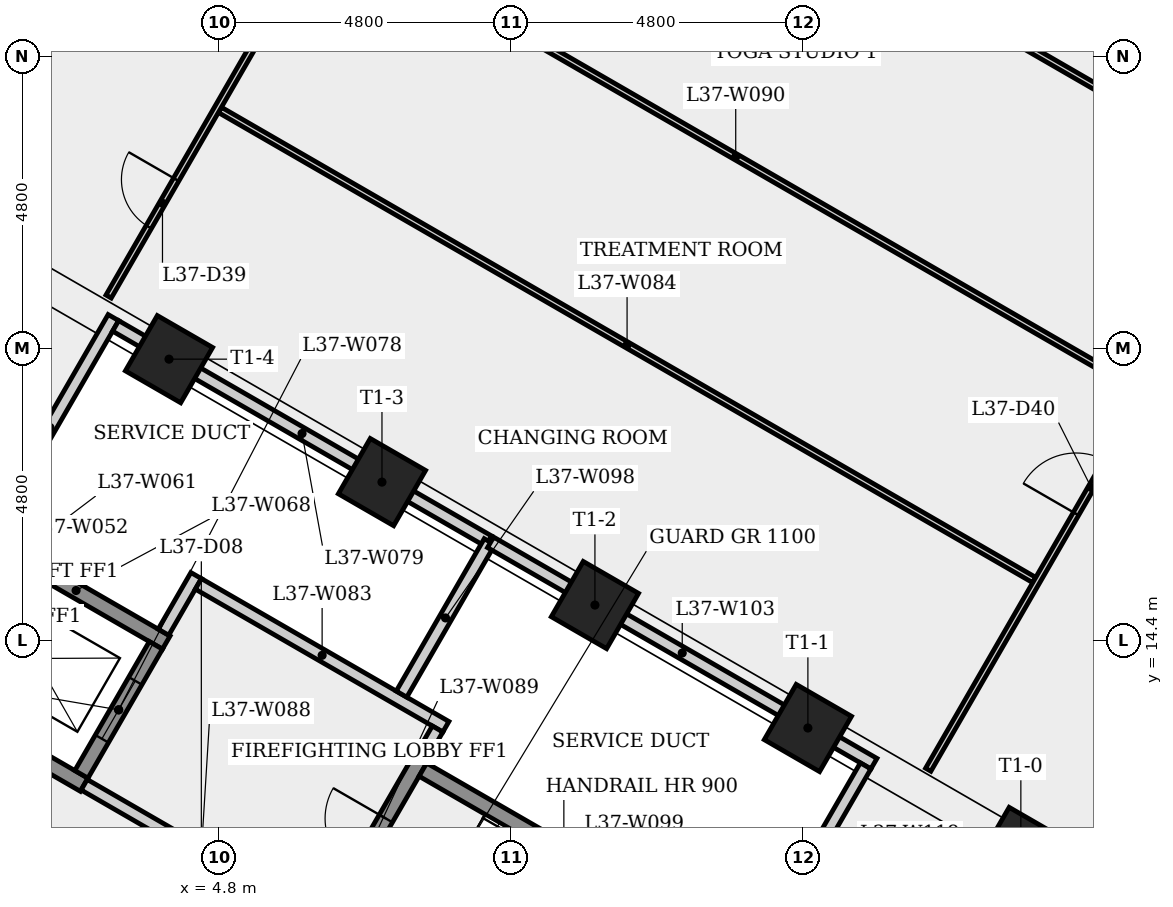
"""IFC4 building model, lengths in metres.
Left out: names, types, materials, properties, quantities, classifications, styles, units other than length and angle.
Written with IfcOpenShell. Run it as: python <this file> out.ifc"""

import sys

from ifc_helpers import new_model, si_unit, direction, frame, frame_2d, origin, origin_2d, place, context, subcontext, project, spatial, rectangle, extrude, element, fill, save


model = new_model("IFC4")
c1 = context("Model", 3, precision=1e-05, world=origin(), true_north=direction((0.0, 1.0)))
c2 = subcontext(c1, "Body", "Model", "MODEL_VIEW")
j1 = project(units=[si_unit("LENGTHUNIT", "METRE"), si_unit("PLANEANGLEUNIT", "RADIAN")], contexts=[c1])
p1 = place(None, origin())
s1 = spatial("IfcSite", under=j1, at=p1, CompositionType="ELEMENT")
p2 = place(p1, origin())
s2 = spatial("IfcBuilding", under=s1, at=p2, CompositionType="ELEMENT")
p3 = place(p2, frame((0.0, 0.0, 139.9)))
s3 = spatial("IfcBuildingStorey", under=s2, at=p3, CompositionType="ELEMENT", Elevation=139.9)
for number, where, z_axis, x_axis in (
    (1, (17.986, 10.931, 0.0), (0.0, 0.0, 1.0), (0.5, 0.866, 0.0)),
    (2, (14.483, 12.953, 0.0), (0.0, 0.0, 1.0), (0.5, 0.866, 0.0)),
    (3, (10.981, 14.975, 0.0), (0.0, 0.0, 1.0), (0.5, 0.866, 0.0)),
    (4, (7.479, 16.997, 0.0), (0.0, 0.0, 1.0), (0.5, 0.866, 0.0)),
    (5, (3.976, 19.019, 0.0), (0.0, 0.0, 1.0), (0.5, 0.866, 0.0)),
):
    element("IfcColumn", number, at=place(p3, frame(where, z_axis=z_axis, x_axis=x_axis)), inside=s3, PredefinedType="COLUMN", context=c2, shape_type="SweptSolid", body=[
        extrude(rectangle(XDim=1.05, YDim=1.05, at=origin_2d()), origin(), (0.0, 0.0, 1.0), 4.0),
    ])
p4 = place(p3, frame((-0.217, 21.307, 0.0), z_axis=(0.0, 0.0, 1.0), x_axis=(0.499991872758, 0.866030095999, 0.0)))
e6 = element("IfcWall", 6, at=p4, inside=s3, PredefinedType="PARTITIONING", context=c2, shape_type="SweptSolid", body=[
    extrude(rectangle(XDim=16.316, YDim=0.1, at=frame_2d((8.158, 0.0))), origin(), (0.0, 0.0, 1.0), 3.6),
])
p5 = place(p4, frame((2.887, 0.0, 0.0)))
e7 = element("IfcOpeningElement", 7, at=p5, cuts=e6, PredefinedType="OPENING", context=c2, shape_type="SweptSolid", body=[
    extrude(rectangle(XDim=1.6, YDim=2.1, at=frame_2d((0.8, 1.05))), frame((0.0, 0.06, 0.0), z_axis=(0.0, -1.0, 0.0), x_axis=(1.0, 0.0, 0.0)), (0.0, 0.0, 1.0), 0.12),
])
p6 = place(p4, frame((10.702, 0.0, 0.0)))
e8 = element("IfcOpeningElement", 8, at=p6, cuts=e6, PredefinedType="OPENING", context=c2, shape_type="SweptSolid", body=[
    extrude(rectangle(XDim=1.6, YDim=2.1, at=frame_2d((0.8, 1.05))), frame((0.0, 0.06, 0.0), z_axis=(0.0, -1.0, 0.0), x_axis=(1.0, 0.0, 0.0)), (0.0, 0.0, 1.0), 0.12),
])
p7 = place(p3, frame((0.965, 16.071, 0.0), z_axis=(0.0, 0.0, 1.0), x_axis=(0.866050272892, -0.499956922968, 0.0)))
e9 = element("IfcWall", 9, at=p7, inside=s3, PredefinedType="SHEAR", context=c2, shape_type="SweptSolid", body=[
    extrude(rectangle(XDim=3.425, YDim=0.25, at=frame_2d((1.712, 0.0))), origin(), (0.0, 0.0, 1.0), 3.6),
])
p8 = place(p3, frame((0.975, 16.088, 0.0), z_axis=(0.0, 0.0, 1.0), x_axis=(0.500032984372, 0.866006359411, 0.0)))
e10 = element("IfcWall", 10, at=p8, inside=s3, PredefinedType="PLUMBINGWALL", context=c2, shape_type="SweptSolid", body=[
    extrude(rectangle(XDim=4.174, YDim=0.2, at=frame_2d((2.087, 0.0))), origin(), (0.0, 0.0, 1.0), 3.6),
])
p9 = place(p3, frame((2.581, 12.02, 0.0), z_axis=(0.0, 0.0, 1.0), x_axis=(-0.86603892542, 0.499976579108, 0.0)))
e11 = element("IfcWall", 11, at=p9, inside=s3, PredefinedType="SHEAR", context=c2, shape_type="SweptSolid", body=[
    extrude(rectangle(XDim=2.162, YDim=0.25, at=frame_2d((1.081, 0.0))), origin(), (0.0, 0.0, 1.0), 3.6),
])
p10 = place(p3, frame((2.535, 12.191, 0.0), z_axis=(0.0, 0.0, 1.0), x_axis=(0.500061746146, 0.865989751695, 0.0)))
e12 = element("IfcWall", 12, at=p10, inside=s3, PredefinedType="SHEAR", context=c2, shape_type="SweptSolid", body=[
    extrude(rectangle(XDim=2.45, YDim=0.25, at=frame_2d((1.225, 0.0))), origin(), (0.0, 0.0, 1.0), 4.0),
])
p11 = place(p10, frame((0.675, 0.0, 0.0)))
e13 = element("IfcOpeningElement", 13, at=p11, cuts=e12, PredefinedType="OPENING", context=c2, shape_type="SweptSolid", body=[
    extrude(rectangle(XDim=1.1, YDim=2.1, at=frame_2d((0.55, 1.05))), frame((0.0, 0.135, 0.0), z_axis=(0.0, -1.0, 0.0), x_axis=(1.0, 0.0, 0.0)), (0.0, 0.0, 1.0), 0.27),
])
p12 = place(p3, frame((3.098, 19.566, 0.0), z_axis=(0.0, 0.0, 1.0), x_axis=(0.866019052629, -0.500011000363, 0.0)))
e14 = element("IfcWall", 14, at=p12, inside=s3, PredefinedType="PLUMBINGWALL", context=c2, shape_type="SweptSolid", body=[
    extrude(rectangle(XDim=7.08, YDim=0.2, at=frame_2d((3.54, 0.0))), origin(), (0.0, 0.0, 1.0), 2.725),
])
p13 = place(p3, frame((3.885, 14.529, 0.0), z_axis=(0.0, 0.0, 1.0), x_axis=(0.499997628298, 0.866026773083, 0.0)))
e15 = element("IfcWall", 15, at=p13, inside=s3, PredefinedType="PLUMBINGWALL", context=c2, shape_type="SweptSolid", body=[
    extrude(rectangle(XDim=1.075, YDim=0.2, at=frame_2d((0.538, 0.0))), origin(), (0.0, 0.0, 1.0), 3.6),
])
p14 = place(p3, frame((4.459, 15.323, 0.0), z_axis=(0.0, 0.0, 1.0), x_axis=(0.866016039709, -0.500016218704, 0.0)))
e16 = element("IfcWall", 16, at=p14, inside=s3, PredefinedType="PLUMBINGWALL", context=c2, shape_type="SweptSolid", body=[
    extrude(rectangle(XDim=4.7, YDim=0.2, at=frame_2d((2.35, 0.0))), origin(), (0.0, 0.0, 1.0), 3.6),
])
p15 = place(p3, frame((4.813, 23.119, 0.0), z_axis=(0.0, 0.0, 1.0), x_axis=(0.86602732511, -0.499996672152, 0.0)))
e17 = element("IfcWall", 17, at=p15, inside=s3, PredefinedType="PARTITIONING", context=c2, shape_type="SweptSolid", body=[
    extrude(rectangle(XDim=15.465, YDim=0.1, at=frame_2d((7.732, 0.0))), origin(), (0.0, 0.0, 1.0), 3.6),
])
p16 = place(p3, frame((2.983, 20.049, 0.0), z_axis=(0.0, 0.0, 1.0), x_axis=(0.499998345156, 0.866026359207, 0.0)))
e18 = element("IfcWall", 18, at=p16, inside=s3, PredefinedType="PARTITIONING", context=c2, shape_type="SweptSolid", body=[
    extrude(rectangle(XDim=15.805, YDim=0.1, at=frame_2d((7.903, 0.0))), origin(), (0.0, 0.0, 1.0), 3.6),
])
p17 = place(p16, frame((1.322, 0.0, 0.0)))
e19 = element("IfcOpeningElement", 19, at=p17, cuts=e18, PredefinedType="OPENING", context=c2, shape_type="SweptSolid", body=[
    extrude(rectangle(XDim=0.9, YDim=2.1, at=frame_2d((0.45, 1.05))), frame((0.0, 0.06, 0.0), z_axis=(0.0, -1.0, 0.0), x_axis=(1.0, 0.0, 0.0)), (0.0, 0.0, 1.0), 0.12),
])
p18 = place(p16, frame((8.325, 0.0, 0.0)))
e20 = element("IfcOpeningElement", 20, at=p18, cuts=e18, PredefinedType="OPENING", context=c2, shape_type="SweptSolid", body=[
    extrude(rectangle(XDim=1.6, YDim=2.1, at=frame_2d((0.8, 1.05))), frame((0.0, 0.06, 0.0), z_axis=(0.0, -1.0, 0.0), x_axis=(1.0, 0.0, 0.0)), (0.0, 0.0, 1.0), 0.12),
])
p19 = place(p3, frame((6.435, 9.795, 0.0), z_axis=(0.0, 0.0, 1.0), x_axis=(-0.866012907634, 0.500021643343, 0.0)))
e21 = element("IfcWall", 21, at=p19, inside=s3, PredefinedType="PARTITIONING", context=c2, shape_type="SweptSolid", body=[
    extrude(rectangle(XDim=4.45, YDim=0.2, at=frame_2d((2.225, 0.0))), origin(), (0.0, 0.0, 1.0), 3.6),
])
p20 = place(p19, frame((1.675, 0.0, 0.0)))
e22 = element("IfcOpeningElement", 22, at=p20, cuts=e21, PredefinedType="OPENING", context=c2, shape_type="SweptSolid", body=[
    extrude(rectangle(XDim=1.1, YDim=2.1, at=frame_2d((0.55, 1.05))), frame((0.0, 0.11, 0.0), z_axis=(0.0, -1.0, 0.0), x_axis=(1.0, 0.0, 0.0)), (0.0, 0.0, 1.0), 0.22),
])
p21 = place(p3, frame((6.48, 9.624, 0.0), z_axis=(0.0, 0.0, 1.0), x_axis=(0.500017246033, 0.866015446554, 0.0)))
e23 = element("IfcWall", 23, at=p21, inside=s3, PredefinedType="SHEAR", context=c2, shape_type="SweptSolid", body=[
    extrude(rectangle(XDim=3.25, YDim=0.25, at=frame_2d((1.625, 0.0))), origin(), (0.0, 0.0, 1.0), 3.6),
])
p22 = place(p21, frame((1.125, 0.0, 0.0)))
e24 = element("IfcOpeningElement", 24, at=p22, cuts=e23, PredefinedType="OPENING", context=c2, shape_type="SweptSolid", body=[
    extrude(rectangle(XDim=1.0, YDim=2.1, at=frame_2d((0.5, 1.05))), frame((0.0, 0.135, 0.0), z_axis=(0.0, -1.0, 0.0), x_axis=(1.0, 0.0, 0.0)), (0.0, 0.0, 1.0), 0.27),
])
p23 = place(p3, frame((6.6, 26.214, 0.0), z_axis=(0.0, 0.0, 1.0), x_axis=(0.86602732511, -0.499996672152, 0.0)))
e25 = element("IfcWall", 25, at=p23, inside=s3, PredefinedType="PARTITIONING", context=c2, shape_type="SweptSolid", body=[
    extrude(rectangle(XDim=15.465, YDim=0.1, at=frame_2d((7.732, 0.0))), origin(), (0.0, 0.0, 1.0), 3.6),
])
p24 = place(p3, frame((7.8, 13.51, 0.0), z_axis=(0.0, 0.0, 1.0), x_axis=(0.499995073634, 0.866028248005, 0.0)))
e26 = element("IfcWall", 26, at=p24, inside=s3, PredefinedType="PLUMBINGWALL", context=c2, shape_type="SweptSolid", body=[
    extrude(rectangle(XDim=2.894, YDim=0.2, at=frame_2d((1.447, 0.0))), origin(), (0.0, 0.0, 1.0), 3.6),
])
p25 = place(p3, frame((8.151, 12.268, 0.0), z_axis=(0.0, 0.0, 1.0), x_axis=(0.866025499775, -0.499999833739, 0.0)))
e27 = element("IfcWall", 27, at=p25, inside=s3, PredefinedType="SHEAR", context=c2, shape_type="SweptSolid", body=[
    extrude(rectangle(XDim=6.4, YDim=0.25, at=frame_2d((3.2, 0.0))), origin(), (0.0, 0.0, 1.0), 3.6),
])
p26 = place(p3, frame((8.393, 12.937, 0.0), z_axis=(0.0, 0.0, 1.0), x_axis=(-0.500065409566, -0.86598763626, 0.0)))
e28 = element("IfcWall", 28, at=p26, inside=s3, PredefinedType="PLUMBINGWALL", context=c2, shape_type="SweptSolid", body=[
    extrude(rectangle(XDim=0.575, YDim=0.2, at=frame_2d((0.288, 0.0))), origin(), (0.0, 0.0, 1.0), 3.6),
])
p27 = place(p3, frame((8.578, 29.64, 0.0), z_axis=(0.0, 0.0, 1.0), x_axis=(0.866023378404, -0.500003508045, 0.0)))
e29 = element("IfcWall", 29, at=p27, inside=s3, PredefinedType="PARTITIONING", context=c2, shape_type="SweptSolid", body=[
    extrude(rectangle(XDim=15.465, YDim=0.1, at=frame_2d((7.732, 0.0))), origin(), (0.0, 0.0, 1.0), 3.6),
])
p28 = place(p3, frame((9.264, 16.006, 0.0), z_axis=(0.0, 0.0, 1.0), x_axis=(0.866032567898, -0.499987591186, 0.0)))
e30 = element("IfcWall", 30, at=p28, inside=s3, PredefinedType="PLUMBINGWALL", context=c2, shape_type="SweptSolid", body=[
    extrude(rectangle(XDim=7.28, YDim=0.2, at=frame_2d((3.64, 0.0))), origin(), (0.0, 0.0, 1.0), 2.725),
])
p29 = place(p3, frame((15.432, 12.33, 0.0), z_axis=(0.0, 0.0, 1.0), x_axis=(-0.499961171201, -0.866047820441, 0.0)))
e31 = element("IfcWall", 31, at=p29, inside=s3, PredefinedType="PLUMBINGWALL", context=c2, shape_type="SweptSolid", body=[
    extrude(rectangle(XDim=2.597, YDim=0.2, at=frame_2d((1.298, 0.0))), origin(), (0.0, 0.0, 1.0), 3.6),
])
p30 = place(p3, frame((16.462, 12.267, 0.0), z_axis=(0.0, 0.0, 1.0), x_axis=(0.499991656573, 0.866030220811, 0.0)))
e32 = element("IfcWall", 32, at=p30, inside=s3, PredefinedType="PARTITIONING", context=c2, shape_type="SweptSolid", body=[
    extrude(rectangle(XDim=15.805, YDim=0.1, at=frame_2d((7.903, 0.0))), origin(), (0.0, 0.0, 1.0), 3.6),
])
p31 = place(p30, frame((4.861, 0.0, 0.0)))
e33 = element("IfcOpeningElement", 33, at=p31, cuts=e32, PredefinedType="OPENING", context=c2, shape_type="SweptSolid", body=[
    extrude(rectangle(XDim=1.0, YDim=2.1, at=frame_2d((0.5, 1.05))), frame((0.0, 0.06, 0.0), z_axis=(0.0, -1.0, 0.0), x_axis=(1.0, 0.0, 0.0)), (0.0, 0.0, 1.0), 0.12),
])
p32 = place(p30, frame((12.296, 0.0, 0.0)))
e34 = element("IfcOpeningElement", 34, at=p32, cuts=e32, PredefinedType="OPENING", context=c2, shape_type="SweptSolid", body=[
    extrude(rectangle(XDim=1.6, YDim=2.1, at=frame_2d((0.8, 1.05))), frame((0.0, 0.06, 0.0), z_axis=(0.0, -1.0, 0.0), x_axis=(1.0, 0.0, 0.0)), (0.0, 0.0, 1.0), 0.12),
])
p33 = place(p3, frame((19.152, 10.125, 0.0), z_axis=(0.0, 0.0, 1.0), x_axis=(0.500003095412, 0.86602361664, 0.0)))
e35 = element("IfcWall", 35, at=p33, inside=s3, PredefinedType="PARTITIONING", context=c2, shape_type="SweptSolid", body=[
    extrude(rectangle(XDim=16.316, YDim=0.1, at=frame_2d((8.158, 0.0))), origin(), (0.0, 0.0, 1.0), 3.6),
])
p34 = place(p33, frame((3.067, 0.0, 0.0)))
e36 = element("IfcOpeningElement", 36, at=p34, cuts=e35, PredefinedType="OPENING", context=c2, shape_type="SweptSolid", body=[
    extrude(rectangle(XDim=1.6, YDim=2.1, at=frame_2d((0.8, 1.05))), frame((0.0, 0.06, 0.0), z_axis=(0.0, -1.0, 0.0), x_axis=(1.0, 0.0, 0.0)), (0.0, 0.0, 1.0), 0.12),
])
p35 = place(p33, frame((10.882, 0.0, 0.0)))
e37 = element("IfcOpeningElement", 37, at=p35, cuts=e35, PredefinedType="OPENING", context=c2, shape_type="SweptSolid", body=[
    extrude(rectangle(XDim=1.6, YDim=2.1, at=frame_2d((0.8, 1.05))), frame((0.0, 0.06, 0.0), z_axis=(0.0, -1.0, 0.0), x_axis=(1.0, 0.0, 0.0)), (0.0, 0.0, 1.0), 0.12),
])
p36 = place(p22, origin())
e38 = element("IfcDoor", 38, at=p36, inside=s3, OperationType="SINGLE_SWING_RIGHT", PredefinedType="DOOR", context=c2, shape_type="SweptSolid", body=[
    extrude(rectangle(XDim=1.0, YDim=2.1, at=frame_2d((0.5, 1.05))), frame((0.0, 0.025, 0.0), z_axis=(0.0, -1.0, 0.0), x_axis=(1.0, 0.0, 0.0)), (0.0, 0.0, 1.0), 0.05),
])
fill(e24, e38)
p37 = place(p11, origin())
e39 = element("IfcDoor", 39, at=p37, inside=s3, OperationType="SLIDING_TO_LEFT", PredefinedType="DOOR", context=c2, shape_type="SweptSolid", body=[
    extrude(rectangle(XDim=1.1, YDim=2.1, at=frame_2d((0.55, 1.05))), frame((0.0, 0.025, 0.0), z_axis=(0.0, -1.0, 0.0), x_axis=(1.0, 0.0, 0.0)), (0.0, 0.0, 1.0), 0.05),
])
fill(e13, e39)
p38 = place(p17, origin())
e40 = element("IfcDoor", 40, at=p38, inside=s3, OperationType="SINGLE_SWING_RIGHT", PredefinedType="DOOR", context=c2, shape_type="SweptSolid", body=[
    extrude(rectangle(XDim=0.9, YDim=2.1, at=frame_2d((0.45, 1.05))), frame((0.0, 0.025, 0.0), z_axis=(0.0, -1.0, 0.0), x_axis=(1.0, 0.0, 0.0)), (0.0, 0.0, 1.0), 0.05),
])
fill(e19, e40)
p39 = place(p31, origin())
e41 = element("IfcDoor", 41, at=p39, inside=s3, OperationType="SINGLE_SWING_LEFT", PredefinedType="DOOR", context=c2, shape_type="SweptSolid", body=[
    extrude(rectangle(XDim=1.0, YDim=2.1, at=frame_2d((0.5, 1.05))), frame((0.0, 0.025, 0.0), z_axis=(0.0, -1.0, 0.0), x_axis=(1.0, 0.0, 0.0)), (0.0, 0.0, 1.0), 0.05),
])
fill(e33, e41)
save(model, sys.argv[1])
